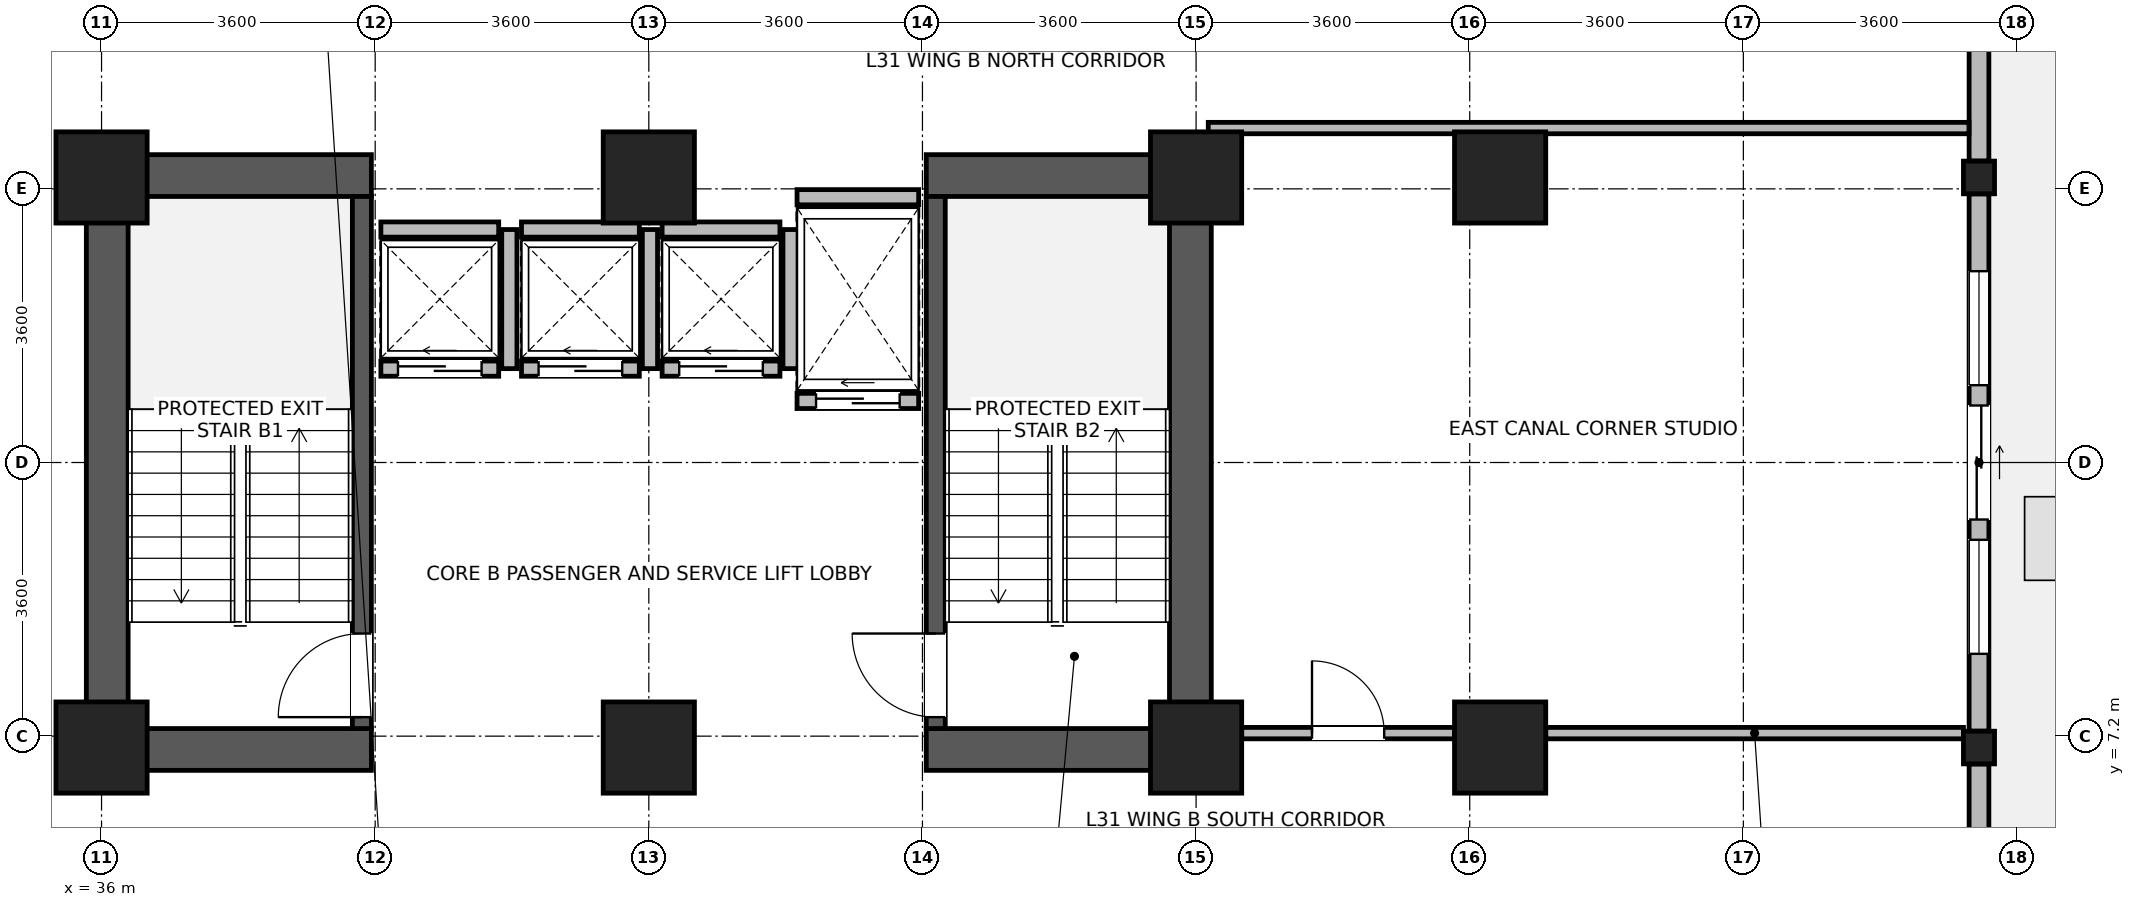
"""IFC4 building model, lengths in metres.
Left out: names, types, materials, properties, quantities, classifications, styles, units other than length and angle.
Written with IfcOpenShell. Run it as: python <this file> out.ifc"""

import sys

from ifc_helpers import new_model, si_unit, direction, frame, frame_2d, origin, origin_2d, place, context, subcontext, project, spatial, rectangle, i_section, extrude, source, transform, mapped, element, fill, save


model = new_model("IFC4")
c1 = context("Model", 3, precision=1e-05, world=origin(), true_north=direction((0.0, 1.0)))
c2 = subcontext(c1, "Body", "Model", "MODEL_VIEW")
j1 = project(units=[si_unit("LENGTHUNIT", "METRE"), si_unit("PLANEANGLEUNIT", "RADIAN")], contexts=[c1])
p1 = place(None, origin())
s1 = spatial("IfcSite", under=j1, at=p1, CompositionType="ELEMENT")
p2 = place(p1, origin())
s2 = spatial("IfcBuilding", under=s1, at=p2, CompositionType="ELEMENT")
p3 = place(p2, frame((0.0, 0.0, 123.0)))
s3 = spatial("IfcBuildingStorey", under=s2, at=p3, CompositionType="ELEMENT", Elevation=123.0)
for number, where, z_axis, x_axis in (
    (1, (36.075, 6.75, 0.0), (0.0, 0.0, 1.0), (0.0, 1.0, 0.0)),
    (2, (50.325, 6.75, 0.0), (0.0, 0.0, 1.0), (0.0, 1.0, 0.0)),
):
    element("IfcWall", number, at=place(p3, frame(where, z_axis=z_axis, x_axis=x_axis)), inside=s3, PredefinedType="SHEAR", context=c2, shape_type="SweptSolid", body=[
        extrude(rectangle(XDim=8.1, YDim=0.55, at=frame_2d((4.05, 0.0))), origin(), (0.0, 0.0, 1.0), 3.45),
    ])
for number, where, z_axis, x_axis in (
    (3, (36.35, 7.025, 0.0), (0.0, 0.0, 1.0), (1.0, 0.0, 0.0)),
    (4, (46.85, 7.025, 0.0), (0.0, 0.0, 1.0), (1.0, 0.0, 0.0)),
    (5, (36.35, 14.575, 0.0), (0.0, 0.0, 1.0), (1.0, 0.0, 0.0)),
    (6, (46.85, 14.575, 0.0), (0.0, 0.0, 1.0), (1.0, 0.0, 0.0)),
):
    element("IfcWall", number, at=place(p3, frame(where, z_axis=z_axis, x_axis=x_axis)), inside=s3, PredefinedType="SHEAR", context=c2, shape_type="SweptSolid", body=[
        extrude(rectangle(XDim=3.2, YDim=0.55, at=frame_2d((1.6, 0.0))), origin(), (0.0, 0.0, 1.0), 3.45),
    ])
p4 = place(p3, frame((39.425, 7.3, 0.0), z_axis=(0.0, 0.0, 1.0), x_axis=(0.0, 1.0, 0.0)))
e7 = element("IfcWall", 7, at=p4, inside=s3, PredefinedType="SHEAR", context=c2, shape_type="SweptSolid", body=[
    extrude(rectangle(XDim=7.0, YDim=0.25, at=frame_2d((3.5, 0.0))), origin(), (0.0, 0.0, 1.0), 3.45),
])
p5 = place(p4, frame((0.15, 0.0, 0.0)))
e8 = element("IfcOpeningElement", 8, at=p5, cuts=e7, PredefinedType="OPENING", context=c2, shape_type="SweptSolid", body=[
    extrude(rectangle(XDim=1.1, YDim=2.08, at=frame_2d((0.55, 1.04))), frame((0.0, 0.135, 0.0), z_axis=(0.0, -1.0, 0.0), x_axis=(1.0, 0.0, 0.0)), (0.0, 0.0, 1.0), 0.27),
])
p6 = place(p3, frame((46.975, 7.3, 0.0), z_axis=(0.0, 0.0, 1.0), x_axis=(0.0, 1.0, 0.0)))
e9 = element("IfcWall", 9, at=p6, inside=s3, PredefinedType="SHEAR", context=c2, shape_type="SweptSolid", body=[
    extrude(rectangle(XDim=7.0, YDim=0.25, at=frame_2d((3.5, 0.0))), origin(), (0.0, 0.0, 1.0), 3.45),
])
p7 = place(p6, frame((0.15, 0.0, 0.0)))
e10 = element("IfcOpeningElement", 10, at=p7, cuts=e9, PredefinedType="OPENING", context=c2, shape_type="SweptSolid", body=[
    extrude(rectangle(XDim=1.1, YDim=2.08, at=frame_2d((0.55, 1.04))), frame((0.0, 0.135, 0.0), z_axis=(0.0, -1.0, 0.0), x_axis=(1.0, 0.0, 0.0)), (0.0, 0.0, 1.0), 0.27),
])
m1 = source(origin(), c2, "Body", "SweptSolid", [
    extrude(rectangle(XDim=1.2, YDim=1.2, at=origin_2d()), origin(), (0.0, 0.0, 1.0), 3.7),
])
for number, where, z_axis, x_axis in (
    (11, (36.0, 7.05, 0.0), (0.0, 0.0, 1.0), (1.0, 0.0, 0.0)),
    (12, (36.0, 14.55, 0.0), (0.0, 0.0, 1.0), (1.0, 0.0, 0.0)),
    (13, (43.2, 7.05, 0.0), (0.0, 0.0, 1.0), (1.0, 0.0, 0.0)),
    (14, (43.2, 14.55, 0.0), (0.0, 0.0, 1.0), (1.0, 0.0, 0.0)),
    (15, (50.4, 7.05, 0.0), (0.0, 0.0, 1.0), (1.0, 0.0, 0.0)),
    (16, (50.4, 14.55, 0.0), (0.0, 0.0, 1.0), (1.0, 0.0, 0.0)),
    (17, (54.4, 7.05, 0.0), (0.0, 0.0, 1.0), (1.0, 0.0, 0.0)),
    (18, (54.4, 14.55, 0.0), (0.0, 0.0, 1.0), (1.0, 0.0, 0.0)),
):
    element("IfcColumn", number, at=place(p3, frame(where, z_axis=z_axis, x_axis=x_axis)), inside=s3, PredefinedType="COLUMN", context=c2, shape_type="MappedRepresentation", body=[
        mapped(m1, transform((0.0, 0.0, 0.0), x_axis=(1.0, 0.0, 0.0), y_axis=(0.0, 1.0, 0.0), z_axis=(0.0, 0.0, 1.0), scale=1.0)),
    ])
m2 = source(origin(), c2, "Body", "SweptSolid", [
    extrude(i_section(OverallWidth=0.409, OverallDepth=0.43, WebThickness=0.024, FlangeThickness=0.033, FilletRadius=0.015, at=origin_2d()), origin(), (0.0, 0.0, 1.0), 3.7),
])
for number, where, z_axis, x_axis in (
    (19, (60.7, 7.05, 0.0), (0.0, 0.0, 1.0), (1.0, 0.0, 0.0)),
    (20, (60.7, 14.55, 0.0), (0.0, 0.0, 1.0), (1.0, 0.0, 0.0)),
):
    element("IfcColumn", number, at=place(p3, frame(where, z_axis=z_axis, x_axis=x_axis)), inside=s3, PredefinedType="COLUMN", context=c2, shape_type="MappedRepresentation", body=[
        mapped(m2, transform((0.0, 0.0, 0.0), x_axis=(1.0, 0.0, 0.0), y_axis=(0.0, 1.0, 0.0), z_axis=(0.0, 0.0, 1.0), scale=1.0)),
    ])
p8 = place(p3, frame((60.7, 6.834, 0.0), z_axis=(0.0, 0.0, 1.0), x_axis=(0.0, -1.0, 0.0)))
e21 = element("IfcWall", 21, at=p8, inside=s3, PredefinedType="STANDARD", context=c2, shape_type="SweptSolid", body=[
    extrude(rectangle(XDim=2.164, YDim=0.26, at=frame_2d((1.082, 0.0))), origin(), (0.0, 0.0, 1.0), 3.43),
])
p9 = place(p3, frame((60.7, 14.334, 0.0), z_axis=(0.0, 0.0, 1.0), x_axis=(0.0, -1.0, 0.0)))
e22 = element("IfcWall", 22, at=p9, inside=s3, PredefinedType="STANDARD", context=c2, shape_type="SweptSolid", body=[
    extrude(rectangle(XDim=7.068, YDim=0.26, at=frame_2d((3.534, 0.0))), origin(), (0.0, 0.0, 1.0), 2.98),
])
p10 = place(p9, frame((2.784, 0.0, 0.0)))
e23 = element("IfcOpeningElement", 23, at=p10, cuts=e22, PredefinedType="OPENING", context=c2, shape_type="SweptSolid", body=[
    extrude(rectangle(XDim=1.5, YDim=2.15, at=frame_2d((0.75, 1.075))), frame((0.0, 0.14, 0.0), z_axis=(0.0, -1.0, 0.0), x_axis=(1.0, 0.0, 0.0)), (0.0, 0.0, 1.0), 0.28),
])
p11 = place(p9, frame((1.017, 0.0, 0.85)))
e24 = element("IfcOpeningElement", 24, at=p11, cuts=e22, PredefinedType="OPENING", context=c2, shape_type="SweptSolid", body=[
    extrude(rectangle(XDim=1.5, YDim=1.85, at=frame_2d((0.75, 0.925))), frame((0.0, 0.14, 0.0), z_axis=(0.0, -1.0, 0.0), x_axis=(1.0, 0.0, 0.0)), (0.0, 0.0, 1.0), 0.28),
])
p12 = place(p9, frame((4.551, 0.0, 0.85)))
e25 = element("IfcOpeningElement", 25, at=p12, cuts=e22, PredefinedType="OPENING", context=c2, shape_type="SweptSolid", body=[
    extrude(rectangle(XDim=1.5, YDim=1.85, at=frame_2d((0.75, 0.925))), frame((0.0, 0.14, 0.0), z_axis=(0.0, -1.0, 0.0), x_axis=(1.0, 0.0, 0.0)), (0.0, 0.0, 1.0), 0.28),
])
p13 = place(p3, frame((60.7, 21.384, 0.0), z_axis=(0.0, 0.0, 1.0), x_axis=(0.0, -1.0, 0.0)))
e26 = element("IfcWall", 26, at=p13, inside=s3, PredefinedType="STANDARD", context=c2, shape_type="SweptSolid", body=[
    extrude(rectangle(XDim=6.618, YDim=0.26, at=frame_2d((3.309, 0.0))), origin(), (0.0, 0.0, 1.0), 2.98),
])
p14 = place(p13, frame((0.905, 0.0, 0.85)))
e27 = element("IfcOpeningElement", 27, at=p14, cuts=e26, PredefinedType="OPENING", context=c2, shape_type="SweptSolid", body=[
    extrude(rectangle(XDim=1.5, YDim=1.85, at=frame_2d((0.75, 0.925))), frame((0.0, 0.14, 0.0), z_axis=(0.0, -1.0, 0.0), x_axis=(1.0, 0.0, 0.0)), (0.0, 0.0, 1.0), 0.28),
])
p15 = place(p13, frame((2.834, 0.0, 0.85)))
e28 = element("IfcOpeningElement", 28, at=p15, cuts=e26, PredefinedType="OPENING", context=c2, shape_type="SweptSolid", body=[
    extrude(rectangle(XDim=0.95, YDim=1.75, at=frame_2d((0.475, 0.875))), frame((0.0, 0.14, 0.0), z_axis=(0.0, -1.0, 0.0), x_axis=(1.0, 0.0, 0.0)), (0.0, 0.0, 1.0), 0.28),
])
p16 = place(p3, frame((39.675, 12.035, 0.0), z_axis=(0.0, 0.0, 1.0), x_axis=(1.0, 0.0, 0.0)))
e29 = element("IfcWall", 29, at=p16, inside=s3, PredefinedType="PARTITIONING", context=c2, shape_type="SweptSolid", body=[
    extrude(rectangle(XDim=1.55, YDim=0.2, at=frame_2d((0.775, 0.0))), origin(), (0.0, 0.0, 1.0), 3.43),
])
p17 = place(p16, frame((0.225, 0.0, 0.0)))
e30 = element("IfcOpeningElement", 30, at=p17, cuts=e29, PredefinedType="OPENING", context=c2, shape_type="SweptSolid", body=[
    extrude(rectangle(XDim=1.1, YDim=2.12, at=frame_2d((0.55, 1.06))), frame((0.0, 0.11, 0.0), z_axis=(0.0, -1.0, 0.0), x_axis=(1.0, 0.0, 0.0)), (0.0, 0.0, 1.0), 0.22),
])
p18 = place(p3, frame((39.675, 13.865, 0.0), z_axis=(0.0, 0.0, 1.0), x_axis=(1.0, 0.0, 0.0)))
e31 = element("IfcWall", 31, at=p18, inside=s3, PredefinedType="PARTITIONING", context=c2, shape_type="SweptSolid", body=[
    extrude(rectangle(XDim=1.55, YDim=0.2, at=frame_2d((0.775, 0.0))), origin(), (0.0, 0.0, 1.0), 3.43),
])
p19 = place(p3, frame((41.365, 12.035, 0.0), z_axis=(0.0, 0.0, 1.0), x_axis=(0.0, 1.0, 0.0)))
e32 = element("IfcWall", 32, at=p19, inside=s3, PredefinedType="PARTITIONING", context=c2, shape_type="SweptSolid", body=[
    extrude(rectangle(XDim=1.83, YDim=0.2, at=frame_2d((0.915, 0.0))), origin(), (0.0, 0.0, 1.0), 3.43),
])
p20 = place(p3, frame((41.525, 12.035, 0.0), z_axis=(0.0, 0.0, 1.0), x_axis=(1.0, 0.0, 0.0)))
e33 = element("IfcWall", 33, at=p20, inside=s3, PredefinedType="PARTITIONING", context=c2, shape_type="SweptSolid", body=[
    extrude(rectangle(XDim=1.55, YDim=0.2, at=frame_2d((0.775, 0.0))), origin(), (0.0, 0.0, 1.0), 3.43),
])
p21 = place(p20, frame((0.225, 0.0, 0.0)))
e34 = element("IfcOpeningElement", 34, at=p21, cuts=e33, PredefinedType="OPENING", context=c2, shape_type="SweptSolid", body=[
    extrude(rectangle(XDim=1.1, YDim=2.12, at=frame_2d((0.55, 1.06))), frame((0.0, 0.11, 0.0), z_axis=(0.0, -1.0, 0.0), x_axis=(1.0, 0.0, 0.0)), (0.0, 0.0, 1.0), 0.22),
])
p22 = place(p3, frame((41.525, 13.865, 0.0), z_axis=(0.0, 0.0, 1.0), x_axis=(1.0, 0.0, 0.0)))
e35 = element("IfcWall", 35, at=p22, inside=s3, PredefinedType="PARTITIONING", context=c2, shape_type="SweptSolid", body=[
    extrude(rectangle(XDim=1.55, YDim=0.2, at=frame_2d((0.775, 0.0))), origin(), (0.0, 0.0, 1.0), 3.43),
])
p23 = place(p3, frame((43.215, 12.035, 0.0), z_axis=(0.0, 0.0, 1.0), x_axis=(0.0, 1.0, 0.0)))
e36 = element("IfcWall", 36, at=p23, inside=s3, PredefinedType="PARTITIONING", context=c2, shape_type="SweptSolid", body=[
    extrude(rectangle(XDim=1.83, YDim=0.2, at=frame_2d((0.915, 0.0))), origin(), (0.0, 0.0, 1.0), 3.43),
])
p24 = place(p3, frame((43.375, 12.035, 0.0), z_axis=(0.0, 0.0, 1.0), x_axis=(1.0, 0.0, 0.0)))
e37 = element("IfcWall", 37, at=p24, inside=s3, PredefinedType="PARTITIONING", context=c2, shape_type="SweptSolid", body=[
    extrude(rectangle(XDim=1.55, YDim=0.2, at=frame_2d((0.775, 0.0))), origin(), (0.0, 0.0, 1.0), 3.43),
])
p25 = place(p24, frame((0.225, 0.0, 0.0)))
e38 = element("IfcOpeningElement", 38, at=p25, cuts=e37, PredefinedType="OPENING", context=c2, shape_type="SweptSolid", body=[
    extrude(rectangle(XDim=1.1, YDim=2.12, at=frame_2d((0.55, 1.06))), frame((0.0, 0.11, 0.0), z_axis=(0.0, -1.0, 0.0), x_axis=(1.0, 0.0, 0.0)), (0.0, 0.0, 1.0), 0.22),
])
p26 = place(p3, frame((43.375, 13.865, 0.0), z_axis=(0.0, 0.0, 1.0), x_axis=(1.0, 0.0, 0.0)))
e39 = element("IfcWall", 39, at=p26, inside=s3, PredefinedType="PARTITIONING", context=c2, shape_type="SweptSolid", body=[
    extrude(rectangle(XDim=1.55, YDim=0.2, at=frame_2d((0.775, 0.0))), origin(), (0.0, 0.0, 1.0), 3.43),
])
p27 = place(p3, frame((45.065, 12.035, 0.0), z_axis=(0.0, 0.0, 1.0), x_axis=(0.0, 1.0, 0.0)))
e40 = element("IfcWall", 40, at=p27, inside=s3, PredefinedType="PARTITIONING", context=c2, shape_type="SweptSolid", body=[
    extrude(rectangle(XDim=1.83, YDim=0.2, at=frame_2d((0.915, 0.0))), origin(), (0.0, 0.0, 1.0), 3.43),
])
p28 = place(p3, frame((45.15, 11.61, 0.0), z_axis=(0.0, 0.0, 1.0), x_axis=(1.0, 0.0, 0.0)))
e41 = element("IfcWall", 41, at=p28, inside=s3, PredefinedType="PARTITIONING", context=c2, shape_type="SweptSolid", body=[
    extrude(rectangle(XDim=1.6, YDim=0.2, at=frame_2d((0.8, 0.0))), origin(), (0.0, 0.0, 1.0), 3.43),
])
p29 = place(p28, frame((0.25, 0.0, 0.0)))
e42 = element("IfcOpeningElement", 42, at=p29, cuts=e41, PredefinedType="OPENING", context=c2, shape_type="SweptSolid", body=[
    extrude(rectangle(XDim=1.1, YDim=2.12, at=frame_2d((0.55, 1.06))), frame((0.0, 0.11, 0.0), z_axis=(0.0, -1.0, 0.0), x_axis=(1.0, 0.0, 0.0)), (0.0, 0.0, 1.0), 0.22),
])
p30 = place(p3, frame((45.15, 14.29, 0.0), z_axis=(0.0, 0.0, 1.0), x_axis=(1.0, 0.0, 0.0)))
e43 = element("IfcWall", 43, at=p30, inside=s3, PredefinedType="PARTITIONING", context=c2, shape_type="SweptSolid", body=[
    extrude(rectangle(XDim=1.6, YDim=0.2, at=frame_2d((0.8, 0.0))), origin(), (0.0, 0.0, 1.0), 2.43),
])
p31 = place(p3, frame((51.0, 7.24, 0.0), z_axis=(0.0, 0.0, 1.0), x_axis=(1.0, 0.0, 0.0)))
e44 = element("IfcWall", 44, at=p31, inside=s3, PredefinedType="PARTITIONING", context=c2, shape_type="SweptSolid", body=[
    extrude(rectangle(XDim=2.8, YDim=0.15, at=frame_2d((1.4, 0.0))), origin(), (0.0, 0.0, 1.0), 2.78),
])
p32 = place(p31, frame((0.925, 0.0, 0.0)))
e45 = element("IfcOpeningElement", 45, at=p32, cuts=e44, PredefinedType="OPENING", context=c2, shape_type="SweptSolid", body=[
    extrude(rectangle(XDim=0.95, YDim=2.1, at=frame_2d((0.475, 1.05))), frame((0.0, 0.085, 0.0), z_axis=(0.0, -1.0, 0.0), x_axis=(1.0, 0.0, 0.0)), (0.0, 0.0, 1.0), 0.17),
])
p33 = place(p3, frame((55.0, 7.24, 0.0), z_axis=(0.0, 0.0, 1.0), x_axis=(1.0, 0.0, 0.0)))
e46 = element("IfcWall", 46, at=p33, inside=s3, PredefinedType="PARTITIONING", context=c2, shape_type="SweptSolid", body=[
    extrude(rectangle(XDim=5.496, YDim=0.15, at=frame_2d((2.748, 0.0))), origin(), (0.0, 0.0, 1.0), 2.78),
])
p34 = place(p3, frame((50.56, 15.2, 0.0), z_axis=(0.0, 0.0, 1.0), x_axis=(1.0, 0.0, 0.0)))
e47 = element("IfcWall", 47, at=p34, inside=s3, PredefinedType="PARTITIONING", context=c2, shape_type="SweptSolid", body=[
    extrude(rectangle(XDim=10.008, YDim=0.15, at=frame_2d((5.004, 0.0))), origin(), (0.0, 0.0, 1.0), 3.43),
])
p35 = place(p10, origin())
e48 = element("IfcDoor", 48, at=p35, inside=s3, OperationType="SLIDING_TO_LEFT", PredefinedType="DOOR", context=c2, shape_type="SweptSolid", body=[
    extrude(rectangle(XDim=1.5, YDim=2.15, at=frame_2d((0.75, 1.075))), frame((0.0, 0.025, 0.0), z_axis=(0.0, -1.0, 0.0), x_axis=(1.0, 0.0, 0.0)), (0.0, 0.0, 1.0), 0.05),
])
fill(e23, e48)
p36 = place(p11, origin())
e49 = element("IfcWindow", 49, at=p36, inside=s3, PartitioningType="SINGLE_PANEL", PredefinedType="WINDOW", context=c2, shape_type="SweptSolid", body=[
    extrude(rectangle(XDim=1.5, YDim=1.85, at=frame_2d((0.75, 0.925))), frame((0.0, 0.03, 0.0), z_axis=(0.0, -1.0, 0.0), x_axis=(1.0, 0.0, 0.0)), (0.0, 0.0, 1.0), 0.06),
])
fill(e24, e49)
p37 = place(p12, origin())
e50 = element("IfcWindow", 50, at=p37, inside=s3, PartitioningType="SINGLE_PANEL", PredefinedType="WINDOW", context=c2, shape_type="SweptSolid", body=[
    extrude(rectangle(XDim=1.5, YDim=1.85, at=frame_2d((0.75, 0.925))), frame((0.0, 0.03, 0.0), z_axis=(0.0, -1.0, 0.0), x_axis=(1.0, 0.0, 0.0)), (0.0, 0.0, 1.0), 0.06),
])
fill(e25, e50)
p38 = place(p5, origin())
e51 = element("IfcDoor", 51, at=p38, inside=s3, OperationType="SINGLE_SWING_LEFT", PredefinedType="DOOR", context=c2, shape_type="SweptSolid", body=[
    extrude(rectangle(XDim=1.1, YDim=2.08, at=frame_2d((0.55, 1.04))), frame((0.0, 0.025, 0.0), z_axis=(0.0, -1.0, 0.0), x_axis=(1.0, 0.0, 0.0)), (0.0, 0.0, 1.0), 0.05),
])
fill(e8, e51)
p39 = place(p7, origin())
e52 = element("IfcDoor", 52, at=p39, inside=s3, OperationType="SINGLE_SWING_RIGHT", PredefinedType="DOOR", context=c2, shape_type="SweptSolid", body=[
    extrude(rectangle(XDim=1.1, YDim=2.08, at=frame_2d((0.55, 1.04))), frame((0.0, 0.025, 0.0), z_axis=(0.0, -1.0, 0.0), x_axis=(1.0, 0.0, 0.0)), (0.0, 0.0, 1.0), 0.05),
])
fill(e10, e52)
p40 = place(p17, origin())
e53 = element("IfcDoor", 53, at=p40, inside=s3, OperationType="SLIDING_TO_LEFT", PredefinedType="DOOR", context=c2, shape_type="SweptSolid", body=[
    extrude(rectangle(XDim=1.1, YDim=2.12, at=frame_2d((0.55, 1.06))), frame((0.0, 0.025, 0.0), z_axis=(0.0, -1.0, 0.0), x_axis=(1.0, 0.0, 0.0)), (0.0, 0.0, 1.0), 0.05),
])
fill(e30, e53)
p41 = place(p21, origin())
e54 = element("IfcDoor", 54, at=p41, inside=s3, OperationType="SLIDING_TO_LEFT", PredefinedType="DOOR", context=c2, shape_type="SweptSolid", body=[
    extrude(rectangle(XDim=1.1, YDim=2.12, at=frame_2d((0.55, 1.06))), frame((0.0, 0.025, 0.0), z_axis=(0.0, -1.0, 0.0), x_axis=(1.0, 0.0, 0.0)), (0.0, 0.0, 1.0), 0.05),
])
fill(e34, e54)
p42 = place(p25, origin())
e55 = element("IfcDoor", 55, at=p42, inside=s3, OperationType="SLIDING_TO_LEFT", PredefinedType="DOOR", context=c2, shape_type="SweptSolid", body=[
    extrude(rectangle(XDim=1.1, YDim=2.12, at=frame_2d((0.55, 1.06))), frame((0.0, 0.025, 0.0), z_axis=(0.0, -1.0, 0.0), x_axis=(1.0, 0.0, 0.0)), (0.0, 0.0, 1.0), 0.05),
])
fill(e38, e55)
p43 = place(p29, origin())
e56 = element("IfcDoor", 56, at=p43, inside=s3, OperationType="SLIDING_TO_LEFT", PredefinedType="DOOR", context=c2, shape_type="SweptSolid", body=[
    extrude(rectangle(XDim=1.1, YDim=2.12, at=frame_2d((0.55, 1.06))), frame((0.0, 0.025, 0.0), z_axis=(0.0, -1.0, 0.0), x_axis=(1.0, 0.0, 0.0)), (0.0, 0.0, 1.0), 0.05),
])
fill(e42, e56)
p44 = place(p32, origin())
e57 = element("IfcDoor", 57, at=p44, inside=s3, OperationType="SINGLE_SWING_LEFT", PredefinedType="DOOR", context=c2, shape_type="SweptSolid", body=[
    extrude(rectangle(XDim=0.95, YDim=2.1, at=frame_2d((0.475, 1.05))), frame((0.0, 0.025, 0.0), z_axis=(0.0, -1.0, 0.0), x_axis=(1.0, 0.0, 0.0)), (0.0, 0.0, 1.0), 0.05),
])
fill(e45, e57)
save(model, sys.argv[1])
